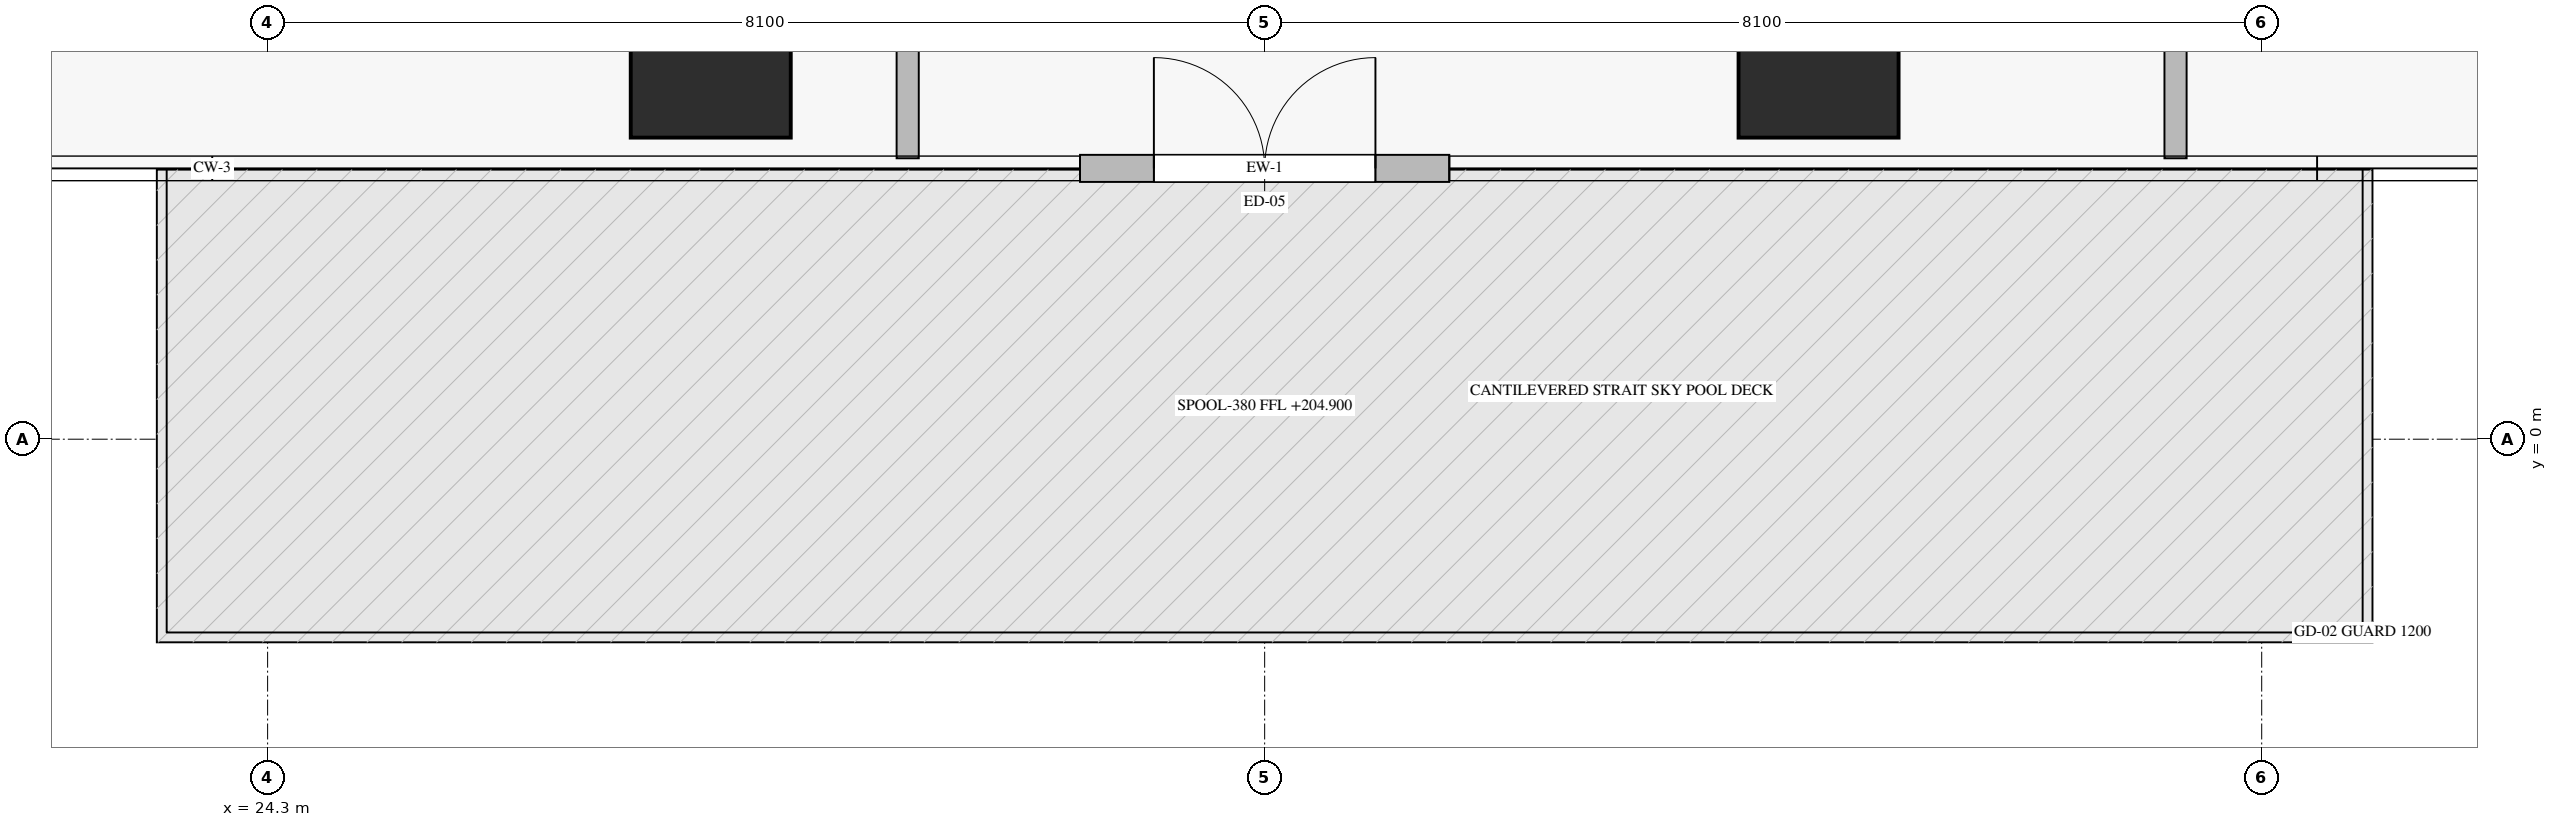
"""IFC4 building model, lengths in metres.
Left out: names, types, materials, properties, quantities, classifications, styles, units other than length and angle.
Written with IfcOpenShell. Run it as: python <this file> out.ifc"""

import sys

from ifc_helpers import new_model, si_unit, direction, frame, frame_2d, origin, origin_2d, place, context, subcontext, project, spatial, rectangle, extrude, source, transform, mapped, element, fill, save


model = new_model("IFC4")
c1 = context("Model", 3, precision=1e-05, world=origin(), true_north=direction((0.0, 1.0)))
c2 = subcontext(c1, "Body", "Model", "MODEL_VIEW")
j1 = project(units=[si_unit("LENGTHUNIT", "METRE"), si_unit("PLANEANGLEUNIT", "RADIAN")], contexts=[c1])
p1 = place(None, origin())
s1 = spatial("IfcSite", under=j1, at=p1, CompositionType="ELEMENT")
p2 = place(p1, origin())
s2 = spatial("IfcBuilding", under=s1, at=p2, CompositionType="ELEMENT")
p3 = place(p2, frame((0.0, 0.0, 204.9)))
s3 = spatial("IfcBuildingStorey", under=s2, at=p3, CompositionType="ELEMENT", Elevation=204.9)
m1 = source(origin(), c2, "Body", "SweptSolid", [
    extrude(rectangle(XDim=1.3, YDim=1.3, at=origin_2d()), origin(), (0.0, 0.0, 1.0), 5.47),
])
for number, where, z_axis, x_axis in (
    (1, (27.9, 3.1, -0.36), (0.0, 0.0, 1.0), (1.0, 0.0, 0.0)),
    (2, (36.9, 3.1, -0.36), (0.0, 0.0, 1.0), (1.0, 0.0, 0.0)),
):
    element("IfcColumn", number, at=place(p3, frame(where, z_axis=z_axis, x_axis=x_axis)), inside=s3, PredefinedType="COLUMN", context=c2, shape_type="MappedRepresentation", body=[
        mapped(m1, transform((0.0, 0.0, 0.0), scale=1.0)),
    ])
p4 = place(p3, frame((30.9, 2.2, 0.0), z_axis=(0.0, 0.0, 1.0), x_axis=(1.0, 0.0, 0.0)))
e3 = element("IfcWall", 3, at=p4, inside=s3, PredefinedType="ELEMENTEDWALL", context=c2, shape_type="SweptSolid", body=[
    extrude(rectangle(XDim=3.0, YDim=0.22, at=frame_2d((1.5, 0.0))), origin(), (0.0, 0.0, 1.0), 3.945),
])
p5 = place(p4, frame((0.6, 0.0, 0.0)))
e4 = element("IfcOpeningElement", 4, at=p5, cuts=e3, PredefinedType="OPENING", context=c2, shape_type="SweptSolid", body=[
    extrude(rectangle(XDim=1.8, YDim=2.4, at=frame_2d((0.9, 1.2))), frame((0.0, 0.12, 0.0), z_axis=(0.0, -1.0, 0.0), x_axis=(1.0, 0.0, 0.0)), (0.0, 0.0, 1.0), 0.24),
])
for number, where, z_axis, x_axis in (
    (5, (29.5, 2.282, 0.0), (0.0, 0.0, 1.0), (0.0, 1.0, 0.0)),
    (6, (39.8, 2.282, 0.0), (0.0, 0.0, 1.0), (0.0, 1.0, 0.0)),
):
    element("IfcWall", number, at=place(p3, frame(where, z_axis=z_axis, x_axis=x_axis)), inside=s3, PredefinedType="PARTITIONING", context=c2, shape_type="SweptSolid", body=[
        extrude(rectangle(XDim=12.618, YDim=0.18, at=frame_2d((6.309, 0.0))), origin(), (0.0, 0.0, 1.0), 5.11),
    ])
m2 = source(origin(), c2, "Body", "SweptSolid", [
    extrude(rectangle(XDim=1.8, YDim=2.4, at=frame_2d((0.9, 1.2))), frame((0.0, 0.025, 0.0), z_axis=(0.0, -1.0, 0.0), x_axis=(1.0, 0.0, 0.0)), (0.0, 0.0, 1.0), 0.05),
])
p6 = place(p5, origin())
e7 = element("IfcDoor", 7, at=p6, inside=s3, OperationType="DOUBLE_DOOR_SINGLE_SWING", PredefinedType="DOOR", context=c2, shape_type="MappedRepresentation", body=[
    mapped(m2, transform((0.0, 0.0, 0.0), scale=1.0)),
])
fill(e4, e7)
save(model, sys.argv[1])
